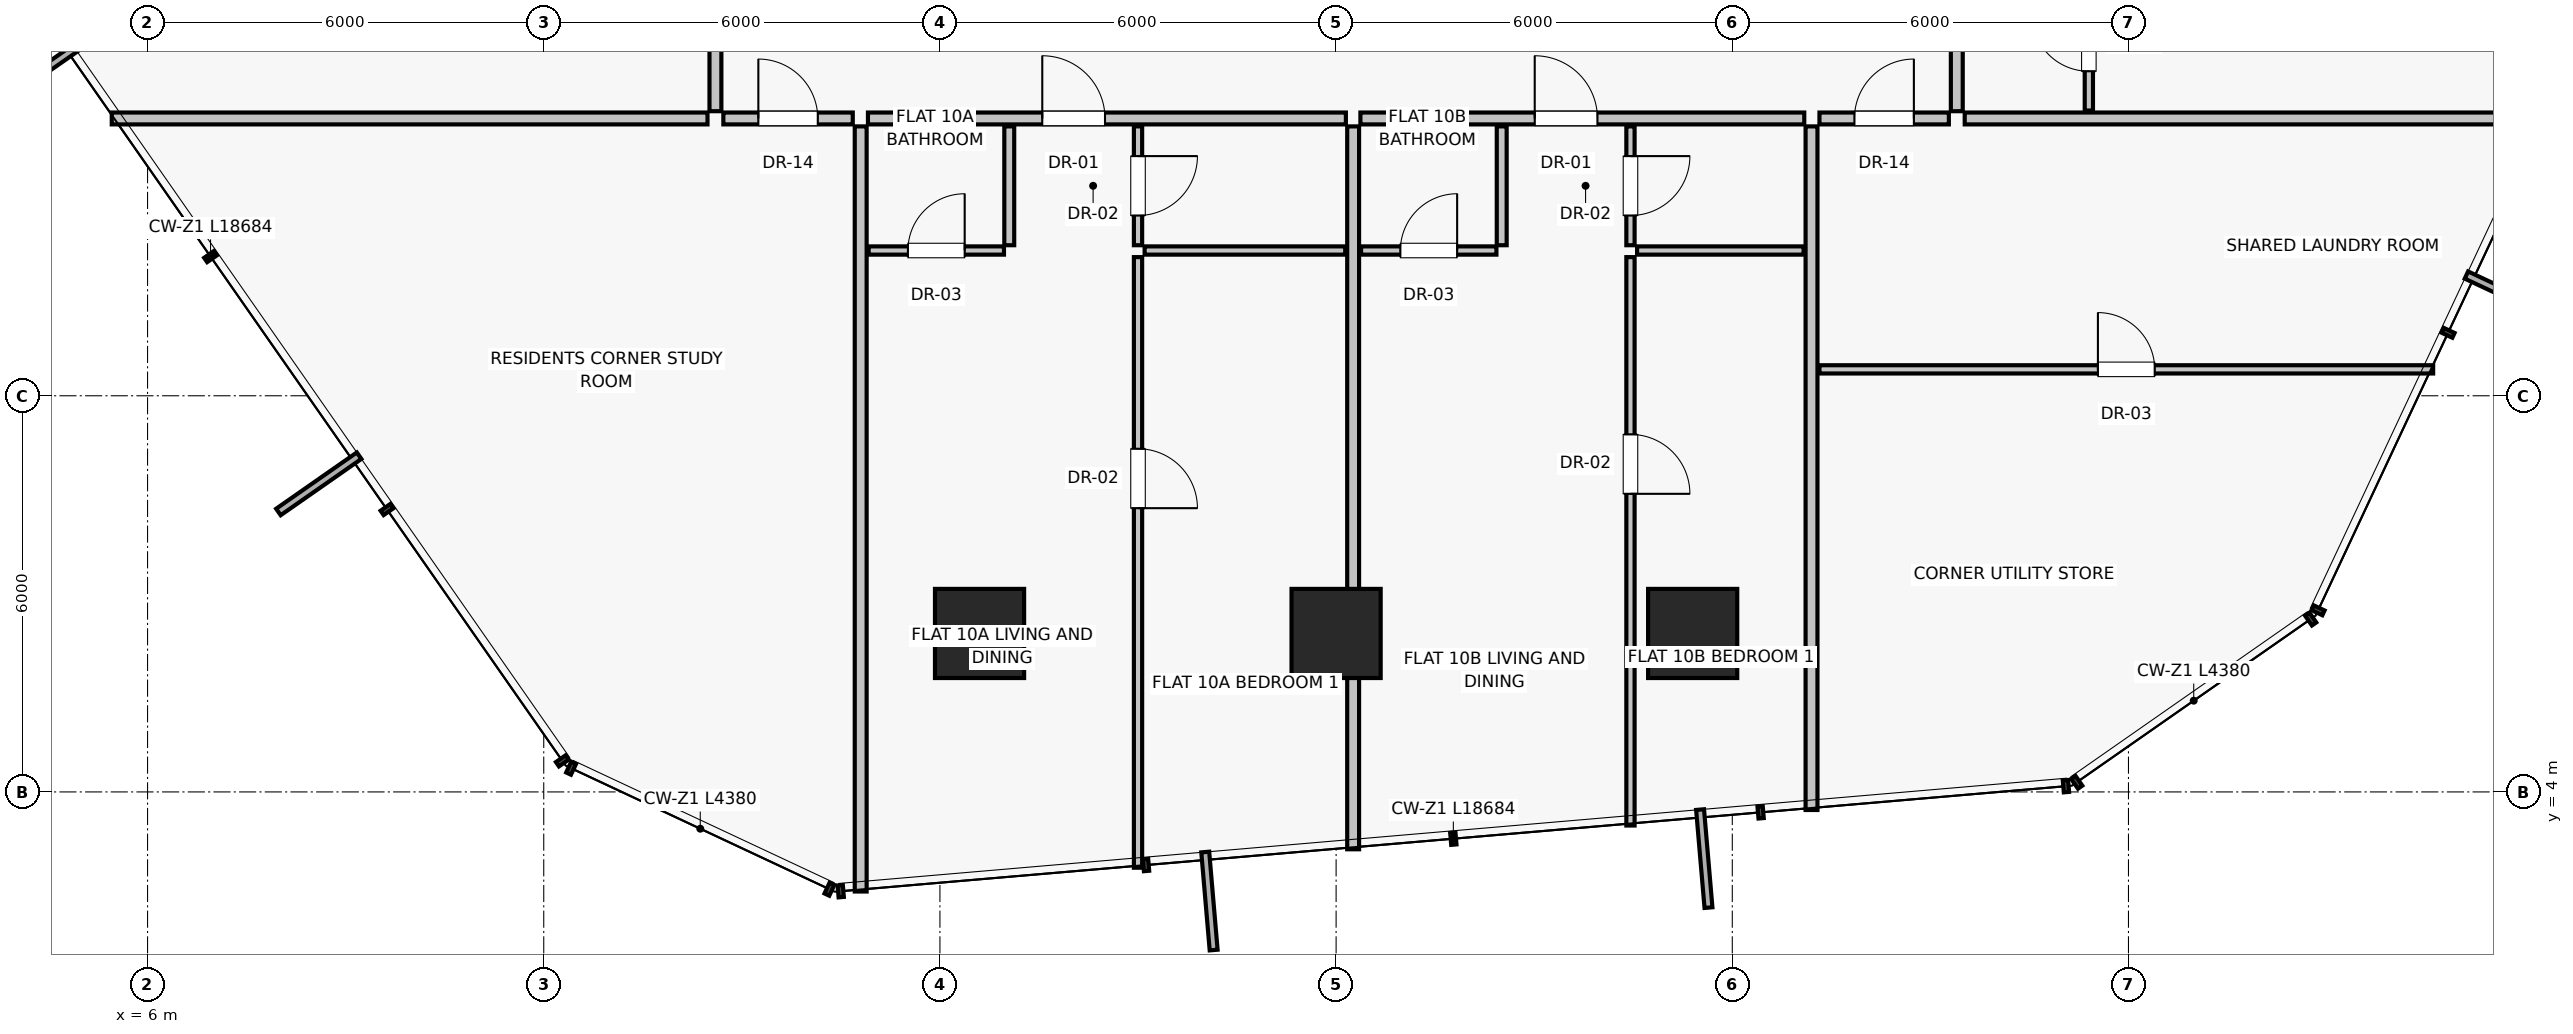
"""IFC4 building model, lengths in metres.
Left out: names, types, materials, properties, quantities, classifications, styles, units other than length and angle.
Written with IfcOpenShell. Run it as: python <this file> out.ifc"""

import sys

from ifc_helpers import new_model, si_unit, direction, frame, frame_2d, origin, origin_2d, place, context, subcontext, project, spatial, rectangle, extrude, source, transform, mapped, element, fill, save


model = new_model("IFC4")
c1 = context("Model", 3, precision=1e-05, world=origin(), true_north=direction((0.0, 1.0)))
c2 = subcontext(c1, "Body", "Model", "MODEL_VIEW")
j1 = project(units=[si_unit("LENGTHUNIT", "METRE"), si_unit("PLANEANGLEUNIT", "RADIAN")], contexts=[c1])
p1 = place(None, origin())
s1 = spatial("IfcSite", under=j1, at=p1, CompositionType="ELEMENT")
p2 = place(p1, origin())
s2 = spatial("IfcBuilding", under=s1, at=p2, CompositionType="ELEMENT")
p3 = place(p2, frame((0.0, 0.0, 40.3)))
s3 = spatial("IfcBuildingStorey", under=s2, at=p3, CompositionType="ELEMENT", Elevation=40.3)
for number, where, z_axis, x_axis in (
    (1, (18.6, 6.4, 0.0), (0.0, 0.0, 1.0), (1.0, 0.0, 0.0)),
    (2, (24.0, 6.4, 0.0), (0.0, 0.0, 1.0), (1.0, 0.0, 0.0)),
    (3, (29.4, 6.4, 0.0), (0.0, 0.0, 1.0), (1.0, 0.0, 0.0)),
):
    element("IfcColumn", number, at=place(p3, frame(where, z_axis=z_axis, x_axis=x_axis)), inside=s3, PredefinedType="COLUMN", context=c2, shape_type="SweptSolid", body=[
        extrude(rectangle(XDim=1.35, YDim=1.35, at=origin_2d()), origin(), (0.0, 0.0, 1.0), 3.25),
    ])
p4 = place(p3, frame((16.8, 14.08, 0.0), z_axis=(0.0, 0.0, 1.0), x_axis=(0.0, -1.0, 0.0)))
e4 = element("IfcWall", 4, at=p4, inside=s3, PredefinedType="PARTITIONING", context=c2, shape_type="SweptSolid", body=[
    extrude(rectangle(XDim=11.588, YDim=0.18, at=frame_2d((5.794, 0.0))), origin(), (0.0, 0.0, 1.0), 3.0),
])
p5 = place(p3, frame((31.2, 14.08, 0.0), z_axis=(0.0, 0.0, 1.0), x_axis=(0.0, -1.0, 0.0)))
e5 = element("IfcWall", 5, at=p5, inside=s3, PredefinedType="PARTITIONING", context=c2, shape_type="SweptSolid", body=[
    extrude(rectangle(XDim=10.354, YDim=0.18, at=frame_2d((5.177, 0.0))), origin(), (0.0, 0.0, 1.0), 3.0),
])
p6 = place(p3, frame((16.91, 14.2, 0.0), z_axis=(0.0, 0.0, 1.0), x_axis=(1.0, 0.0, 0.0)))
e6 = element("IfcWall", 6, at=p6, inside=s3, PredefinedType="PARTITIONING", context=c2, shape_type="SweptSolid", body=[
    extrude(rectangle(XDim=7.238, YDim=0.18, at=frame_2d((3.619, 0.0))), origin(), (0.0, 0.0, 1.0), 3.0),
])
p7 = place(p6, frame((2.64, 0.0, 0.0)))
e7 = element("IfcOpeningElement", 7, at=p7, cuts=e6, PredefinedType="OPENING", context=c2, shape_type="SweptSolid", body=[
    extrude(rectangle(XDim=0.95, YDim=2.02, at=frame_2d((0.475, 1.01))), frame((0.0, 0.1, 0.0), z_axis=(0.0, -1.0, 0.0), x_axis=(1.0, 0.0, 0.0)), (0.0, 0.0, 1.0), 0.2),
])
p8 = place(p3, frame((19.05, 14.08, 0.0), z_axis=(0.0, 0.0, 1.0), x_axis=(0.0, -1.0, 0.0)))
e8 = element("IfcWall", 8, at=p8, inside=s3, PredefinedType="PARTITIONING", context=c2, shape_type="SweptSolid", body=[
    extrude(rectangle(XDim=1.8, YDim=0.15, at=frame_2d((0.9, 0.0))), origin(), (0.0, 0.0, 1.0), 3.0),
])
p9 = place(p3, frame((16.92, 12.2, 0.0), z_axis=(0.0, 0.0, 1.0), x_axis=(1.0, 0.0, 0.0)))
e9 = element("IfcWall", 9, at=p9, inside=s3, PredefinedType="PARTITIONING", context=c2, shape_type="SweptSolid", body=[
    extrude(rectangle(XDim=2.05, YDim=0.125, at=frame_2d((1.025, 0.0))), origin(), (0.0, 0.0, 1.0), 3.0),
])
p10 = place(p9, frame((0.595, 0.0, 0.0)))
e10 = element("IfcOpeningElement", 10, at=p10, cuts=e9, PredefinedType="OPENING", context=c2, shape_type="SweptSolid", body=[
    extrude(rectangle(XDim=0.86, YDim=2.01, at=frame_2d((0.43, 1.005))), frame((0.0, 0.073, 0.0), z_axis=(0.0, -1.0, 0.0), x_axis=(1.0, 0.0, 0.0)), (0.0, 0.0, 1.0), 0.145),
])
p11 = place(p3, frame((21.0, 14.08, 0.0), z_axis=(0.0, 0.0, 1.0), x_axis=(0.0, -1.0, 0.0)))
e11 = element("IfcWall", 11, at=p11, inside=s3, PredefinedType="PARTITIONING", context=c2, shape_type="SweptSolid", body=[
    extrude(rectangle(XDim=1.8, YDim=0.125, at=frame_2d((0.9, 0.0))), origin(), (0.0, 0.0, 1.0), 3.0),
])
p12 = place(p11, frame((0.45, 0.0, 0.0)))
e12 = element("IfcOpeningElement", 12, at=p12, cuts=e11, PredefinedType="OPENING", context=c2, shape_type="SweptSolid", body=[
    extrude(rectangle(XDim=0.9, YDim=2.01, at=frame_2d((0.45, 1.005))), frame((0.0, 0.073, 0.0), z_axis=(0.0, -1.0, 0.0), x_axis=(1.0, 0.0, 0.0)), (0.0, 0.0, 1.0), 0.145),
])
p13 = place(p3, frame((21.1, 12.2, 0.0), z_axis=(0.0, 0.0, 1.0), x_axis=(1.0, 0.0, 0.0)))
e13 = element("IfcWall", 13, at=p13, inside=s3, PredefinedType="PARTITIONING", context=c2, shape_type="SweptSolid", body=[
    extrude(rectangle(XDim=3.038, YDim=0.125, at=frame_2d((1.519, 0.0))), origin(), (0.0, 0.0, 1.0), 3.0),
])
p14 = place(p3, frame((21.0, 12.1, 0.0), z_axis=(0.0, 0.0, 1.0), x_axis=(0.0, -1.0, 0.0)))
e14 = element("IfcWall", 14, at=p14, inside=s3, PredefinedType="PARTITIONING", context=c2, shape_type="SweptSolid", body=[
    extrude(rectangle(XDim=9.248, YDim=0.125, at=frame_2d((4.624, 0.0))), origin(), (0.0, 0.0, 1.0), 3.0),
])
p15 = place(p14, frame((2.902, 0.0, 0.0)))
e15 = element("IfcOpeningElement", 15, at=p15, cuts=e14, PredefinedType="OPENING", context=c2, shape_type="SweptSolid", body=[
    extrude(rectangle(XDim=0.9, YDim=2.01, at=frame_2d((0.45, 1.005))), frame((0.0, 0.073, 0.0), z_axis=(0.0, -1.0, 0.0), x_axis=(1.0, 0.0, 0.0)), (0.0, 0.0, 1.0), 0.145),
])
p16 = place(p3, frame((24.258, 14.08, 0.0), z_axis=(0.0, 0.0, 1.0), x_axis=(0.0, -1.0, 0.0)))
e16 = element("IfcWall", 16, at=p16, inside=s3, PredefinedType="PARTITIONING", context=c2, shape_type="SweptSolid", body=[
    extrude(rectangle(XDim=10.949, YDim=0.18, at=frame_2d((5.475, 0.0))), origin(), (0.0, 0.0, 1.0), 3.0),
])
p17 = place(p3, frame((24.368, 14.2, 0.0), z_axis=(0.0, 0.0, 1.0), x_axis=(1.0, 0.0, 0.0)))
e17 = element("IfcWall", 17, at=p17, inside=s3, PredefinedType="PARTITIONING", context=c2, shape_type="SweptSolid", body=[
    extrude(rectangle(XDim=6.722, YDim=0.18, at=frame_2d((3.361, 0.0))), origin(), (0.0, 0.0, 1.0), 3.0),
])
p18 = place(p17, frame((2.64, 0.0, 0.0)))
e18 = element("IfcOpeningElement", 18, at=p18, cuts=e17, PredefinedType="OPENING", context=c2, shape_type="SweptSolid", body=[
    extrude(rectangle(XDim=0.95, YDim=2.02, at=frame_2d((0.475, 1.01))), frame((0.0, 0.1, 0.0), z_axis=(0.0, -1.0, 0.0), x_axis=(1.0, 0.0, 0.0)), (0.0, 0.0, 1.0), 0.2),
])
p19 = place(p3, frame((26.508, 14.08, 0.0), z_axis=(0.0, 0.0, 1.0), x_axis=(0.0, -1.0, 0.0)))
e19 = element("IfcWall", 19, at=p19, inside=s3, PredefinedType="PARTITIONING", context=c2, shape_type="SweptSolid", body=[
    extrude(rectangle(XDim=1.8, YDim=0.15, at=frame_2d((0.9, 0.0))), origin(), (0.0, 0.0, 1.0), 3.0),
])
p20 = place(p3, frame((24.378, 12.2, 0.0), z_axis=(0.0, 0.0, 1.0), x_axis=(1.0, 0.0, 0.0)))
e20 = element("IfcWall", 20, at=p20, inside=s3, PredefinedType="PARTITIONING", context=c2, shape_type="SweptSolid", body=[
    extrude(rectangle(XDim=2.05, YDim=0.125, at=frame_2d((1.025, 0.0))), origin(), (0.0, 0.0, 1.0), 3.0),
])
p21 = place(p20, frame((0.595, 0.0, 0.0)))
e21 = element("IfcOpeningElement", 21, at=p21, cuts=e20, PredefinedType="OPENING", context=c2, shape_type="SweptSolid", body=[
    extrude(rectangle(XDim=0.86, YDim=2.01, at=frame_2d((0.43, 1.005))), frame((0.0, 0.073, 0.0), z_axis=(0.0, -1.0, 0.0), x_axis=(1.0, 0.0, 0.0)), (0.0, 0.0, 1.0), 0.145),
])
p22 = place(p3, frame((28.458, 14.08, 0.0), z_axis=(0.0, 0.0, 1.0), x_axis=(0.0, -1.0, 0.0)))
e22 = element("IfcWall", 22, at=p22, inside=s3, PredefinedType="PARTITIONING", context=c2, shape_type="SweptSolid", body=[
    extrude(rectangle(XDim=1.8, YDim=0.125, at=frame_2d((0.9, 0.0))), origin(), (0.0, 0.0, 1.0), 3.0),
])
p23 = place(p22, frame((0.45, 0.0, 0.0)))
e23 = element("IfcOpeningElement", 23, at=p23, cuts=e22, PredefinedType="OPENING", context=c2, shape_type="SweptSolid", body=[
    extrude(rectangle(XDim=0.9, YDim=2.01, at=frame_2d((0.45, 1.005))), frame((0.0, 0.073, 0.0), z_axis=(0.0, -1.0, 0.0), x_axis=(1.0, 0.0, 0.0)), (0.0, 0.0, 1.0), 0.145),
])
p24 = place(p3, frame((28.558, 12.2, 0.0), z_axis=(0.0, 0.0, 1.0), x_axis=(1.0, 0.0, 0.0)))
e24 = element("IfcWall", 24, at=p24, inside=s3, PredefinedType="PARTITIONING", context=c2, shape_type="SweptSolid", body=[
    extrude(rectangle(XDim=2.522, YDim=0.125, at=frame_2d((1.261, 0.0))), origin(), (0.0, 0.0, 1.0), 3.0),
])
p25 = place(p3, frame((28.458, 12.1, 0.0), z_axis=(0.0, 0.0, 1.0), x_axis=(0.0, -1.0, 0.0)))
e25 = element("IfcWall", 25, at=p25, inside=s3, PredefinedType="PARTITIONING", context=c2, shape_type="SweptSolid", body=[
    extrude(rectangle(XDim=8.609, YDim=0.125, at=frame_2d((4.304, 0.0))), origin(), (0.0, 0.0, 1.0), 3.0),
])
p26 = place(p25, frame((2.685, 0.0, 0.0)))
e26 = element("IfcOpeningElement", 26, at=p26, cuts=e25, PredefinedType="OPENING", context=c2, shape_type="SweptSolid", body=[
    extrude(rectangle(XDim=0.9, YDim=2.01, at=frame_2d((0.45, 1.005))), frame((0.0, 0.073, 0.0), z_axis=(0.0, -1.0, 0.0), x_axis=(1.0, 0.0, 0.0)), (0.0, 0.0, 1.0), 0.145),
])
p27 = place(p3, frame((14.48, 14.2, 0.0), z_axis=(0.0, 0.0, 1.0), x_axis=(-1.0, 0.0, 0.0)))
e27 = element("IfcWall", 27, at=p27, inside=s3, PredefinedType="PARTITIONING", context=c2, shape_type="SweptSolid", body=[
    extrude(rectangle(XDim=9.022, YDim=0.18, at=frame_2d((4.511, 0.0))), origin(), (0.0, 0.0, 1.0), 3.0),
])
p28 = place(p3, frame((14.6, 14.31, 0.0), z_axis=(0.0, 0.0, 1.0), x_axis=(0.0, 1.0, 0.0)))
e28 = element("IfcWall", 28, at=p28, inside=s3, PredefinedType="PARTITIONING", context=c2, shape_type="SweptSolid", body=[
    extrude(rectangle(XDim=3.697, YDim=0.18, at=frame_2d((1.849, 0.0))), origin(), (0.0, 0.0, 1.0), 3.0),
])
p29 = place(p28, frame((1.348, 0.0, 0.0)))
e29 = element("IfcOpeningElement", 29, at=p29, cuts=e28, PredefinedType="OPENING", context=c2, shape_type="SweptSolid", body=[
    extrude(rectangle(XDim=1.0, YDim=2.01, at=frame_2d((0.5, 1.005))), frame((0.0, 0.1, 0.0), z_axis=(0.0, -1.0, 0.0), x_axis=(1.0, 0.0, 0.0)), (0.0, 0.0, 1.0), 0.2),
])
p30 = place(p3, frame((33.52, 14.2, 0.0), z_axis=(0.0, 0.0, 1.0), x_axis=(1.0, 0.0, 0.0)))
e30 = element("IfcWall", 30, at=p30, inside=s3, PredefinedType="PARTITIONING", context=c2, shape_type="SweptSolid", body=[
    extrude(rectangle(XDim=8.875, YDim=0.18, at=frame_2d((4.437, 0.0))), origin(), (0.0, 0.0, 1.0), 3.0),
])
p31 = place(p3, frame((33.4, 14.31, 0.0), z_axis=(0.0, 0.0, 1.0), x_axis=(0.0, 1.0, 0.0)))
e31 = element("IfcWall", 31, at=p31, inside=s3, PredefinedType="PARTITIONING", context=c2, shape_type="SweptSolid", body=[
    extrude(rectangle(XDim=10.088, YDim=0.18, at=frame_2d((5.044, 0.0))), origin(), (0.0, 0.0, 1.0), 3.0),
])
p32 = place(p31, frame((3.426, 0.0, 0.0)))
e32 = element("IfcOpeningElement", 32, at=p32, cuts=e31, PredefinedType="OPENING", context=c2, shape_type="SweptSolid", body=[
    extrude(rectangle(XDim=0.95, YDim=2.02, at=frame_2d((0.475, 1.01))), frame((0.0, 0.1, 0.0), z_axis=(0.0, -1.0, 0.0), x_axis=(1.0, 0.0, 0.0)), (0.0, 0.0, 1.0), 0.2),
])
p33 = place(p3, frame((35.4, 14.32, 0.0), z_axis=(0.0, 0.0, 1.0), x_axis=(0.0, 1.0, 0.0)))
e33 = element("IfcWall", 33, at=p33, inside=s3, PredefinedType="PARTITIONING", context=c2, shape_type="SweptSolid", body=[
    extrude(rectangle(XDim=2.05, YDim=0.125, at=frame_2d((1.025, 0.0))), origin(), (0.0, 0.0, 1.0), 3.0),
])
p34 = place(p33, frame((0.595, 0.0, 0.0)))
e34 = element("IfcOpeningElement", 34, at=p34, cuts=e33, PredefinedType="OPENING", context=c2, shape_type="SweptSolid", body=[
    extrude(rectangle(XDim=0.86, YDim=2.01, at=frame_2d((0.43, 1.005))), frame((0.0, 0.073, 0.0), z_axis=(0.0, -1.0, 0.0), x_axis=(1.0, 0.0, 0.0)), (0.0, 0.0, 1.0), 0.145),
])
p35 = place(p3, frame((14.72, 14.2, 0.0), z_axis=(0.0, 0.0, 1.0), x_axis=(1.0, 0.0, 0.0)))
e35 = element("IfcWall", 35, at=p35, inside=s3, PredefinedType="PARTITIONING", context=c2, shape_type="SweptSolid", body=[
    extrude(rectangle(XDim=1.96, YDim=0.18, at=frame_2d((0.98, 0.0))), origin(), (0.0, 0.0, 1.0), 3.0),
])
p36 = place(p35, frame((0.53, 0.0, 0.0)))
e36 = element("IfcOpeningElement", 36, at=p36, cuts=e35, PredefinedType="OPENING", context=c2, shape_type="SweptSolid", body=[
    extrude(rectangle(XDim=0.9, YDim=2.01, at=frame_2d((0.45, 1.005))), frame((0.0, 0.1, 0.0), z_axis=(0.0, -1.0, 0.0), x_axis=(1.0, 0.0, 0.0)), (0.0, 0.0, 1.0), 0.2),
])
p37 = place(p3, frame((31.32, 14.2, 0.0), z_axis=(0.0, 0.0, 1.0), x_axis=(1.0, 0.0, 0.0)))
e37 = element("IfcWall", 37, at=p37, inside=s3, PredefinedType="PARTITIONING", context=c2, shape_type="SweptSolid", body=[
    extrude(rectangle(XDim=1.96, YDim=0.18, at=frame_2d((0.98, 0.0))), origin(), (0.0, 0.0, 1.0), 3.0),
])
p38 = place(p37, frame((0.53, 0.0, 0.0)))
e38 = element("IfcOpeningElement", 38, at=p38, cuts=e37, PredefinedType="OPENING", context=c2, shape_type="SweptSolid", body=[
    extrude(rectangle(XDim=0.9, YDim=2.01, at=frame_2d((0.45, 1.005))), frame((0.0, 0.1, 0.0), z_axis=(0.0, -1.0, 0.0), x_axis=(1.0, 0.0, 0.0)), (0.0, 0.0, 1.0), 0.2),
])
p39 = place(p3, frame((31.32, 10.4, 0.0), z_axis=(0.0, 0.0, 1.0), x_axis=(1.0, 0.0, 0.0)))
e39 = element("IfcWall", 39, at=p39, inside=s3, PredefinedType="PARTITIONING", context=c2, shape_type="SweptSolid", body=[
    extrude(rectangle(XDim=9.294, YDim=0.125, at=frame_2d((4.647, 0.0))), origin(), (0.0, 0.0, 1.0), 3.0),
])
p40 = place(p39, frame((4.217, 0.0, 0.0)))
e40 = element("IfcOpeningElement", 40, at=p40, cuts=e39, PredefinedType="OPENING", context=c2, shape_type="SweptSolid", body=[
    extrude(rectangle(XDim=0.86, YDim=2.01, at=frame_2d((0.43, 1.005))), frame((0.0, 0.073, 0.0), z_axis=(0.0, -1.0, 0.0), x_axis=(1.0, 0.0, 0.0)), (0.0, 0.0, 1.0), 0.145),
])
m1 = source(origin(), c2, "Body", "SweptSolid", [
    extrude(rectangle(XDim=0.95, YDim=2.02, at=frame_2d((0.475, 1.01))), frame((0.0, 0.025, 0.0), z_axis=(0.0, -1.0, 0.0), x_axis=(1.0, 0.0, 0.0)), (0.0, 0.0, 1.0), 0.05),
])
p41 = place(p7, origin())
e41 = element("IfcDoor", 41, at=p41, inside=s3, OperationType="SINGLE_SWING_LEFT", PredefinedType="DOOR", context=c2, shape_type="MappedRepresentation", body=[
    mapped(m1, transform((0.0, 0.0, 0.0), scale=1.0)),
])
fill(e7, e41)
m2 = source(origin(), c2, "Body", "SweptSolid", [
    extrude(rectangle(XDim=0.86, YDim=2.01, at=frame_2d((0.43, 1.005))), frame((0.0, 0.025, 0.0), z_axis=(0.0, -1.0, 0.0), x_axis=(1.0, 0.0, 0.0)), (0.0, 0.0, 1.0), 0.05),
])
p42 = place(p10, origin())
e42 = element("IfcDoor", 42, at=p42, inside=s3, OperationType="SINGLE_SWING_RIGHT", PredefinedType="DOOR", context=c2, shape_type="MappedRepresentation", body=[
    mapped(m2, transform((0.0, 0.0, 0.0), scale=1.0)),
])
fill(e10, e42)
m3 = source(origin(), c2, "Body", "SweptSolid", [
    extrude(rectangle(XDim=0.9, YDim=2.01, at=frame_2d((0.45, 1.005))), frame((0.0, 0.025, 0.0), z_axis=(0.0, -1.0, 0.0), x_axis=(1.0, 0.0, 0.0)), (0.0, 0.0, 1.0), 0.05),
])
p43 = place(p12, origin())
e43 = element("IfcDoor", 43, at=p43, inside=s3, OperationType="SINGLE_SWING_LEFT", PredefinedType="DOOR", context=c2, shape_type="MappedRepresentation", body=[
    mapped(m3, transform((0.0, 0.0, 0.0), scale=1.0)),
])
fill(e12, e43)
p44 = place(p15, origin())
e44 = element("IfcDoor", 44, at=p44, inside=s3, OperationType="SINGLE_SWING_RIGHT", PredefinedType="DOOR", context=c2, shape_type="MappedRepresentation", body=[
    mapped(m3, transform((0.0, 0.0, 0.0), scale=1.0)),
])
fill(e15, e44)
p45 = place(p18, origin())
e45 = element("IfcDoor", 45, at=p45, inside=s3, OperationType="SINGLE_SWING_LEFT", PredefinedType="DOOR", context=c2, shape_type="MappedRepresentation", body=[
    mapped(m1, transform((0.0, 0.0, 0.0), scale=1.0)),
])
fill(e18, e45)
p46 = place(p21, origin())
e46 = element("IfcDoor", 46, at=p46, inside=s3, OperationType="SINGLE_SWING_RIGHT", PredefinedType="DOOR", context=c2, shape_type="MappedRepresentation", body=[
    mapped(m2, transform((0.0, 0.0, 0.0), scale=1.0)),
])
fill(e21, e46)
p47 = place(p23, origin())
e47 = element("IfcDoor", 47, at=p47, inside=s3, OperationType="SINGLE_SWING_LEFT", PredefinedType="DOOR", context=c2, shape_type="MappedRepresentation", body=[
    mapped(m3, transform((0.0, 0.0, 0.0), scale=1.0)),
])
fill(e23, e47)
p48 = place(p26, origin())
e48 = element("IfcDoor", 48, at=p48, inside=s3, OperationType="SINGLE_SWING_RIGHT", PredefinedType="DOOR", context=c2, shape_type="MappedRepresentation", body=[
    mapped(m3, transform((0.0, 0.0, 0.0), scale=1.0)),
])
fill(e26, e48)
p49 = place(p34, origin())
e49 = element("IfcDoor", 49, at=p49, inside=s3, OperationType="SINGLE_SWING_RIGHT", PredefinedType="DOOR", context=c2, shape_type="MappedRepresentation", body=[
    mapped(m2, transform((0.0, 0.0, 0.0), scale=1.0)),
])
fill(e34, e49)
p50 = place(p36, origin())
e50 = element("IfcDoor", 50, at=p50, inside=s3, OperationType="SINGLE_SWING_LEFT", PredefinedType="DOOR", context=c2, shape_type="MappedRepresentation", body=[
    mapped(m3, transform((0.0, 0.0, 0.0), scale=1.0)),
])
fill(e36, e50)
p51 = place(p38, origin())
e51 = element("IfcDoor", 51, at=p51, inside=s3, OperationType="SINGLE_SWING_RIGHT", PredefinedType="DOOR", context=c2, shape_type="MappedRepresentation", body=[
    mapped(m3, transform((0.0, 0.0, 0.0), scale=1.0)),
])
fill(e38, e51)
p52 = place(p40, origin())
e52 = element("IfcDoor", 52, at=p52, inside=s3, OperationType="SINGLE_SWING_LEFT", PredefinedType="DOOR", context=c2, shape_type="MappedRepresentation", body=[
    mapped(m2, transform((0.0, 0.0, 0.0), scale=1.0)),
])
fill(e40, e52)
save(model, sys.argv[1])
